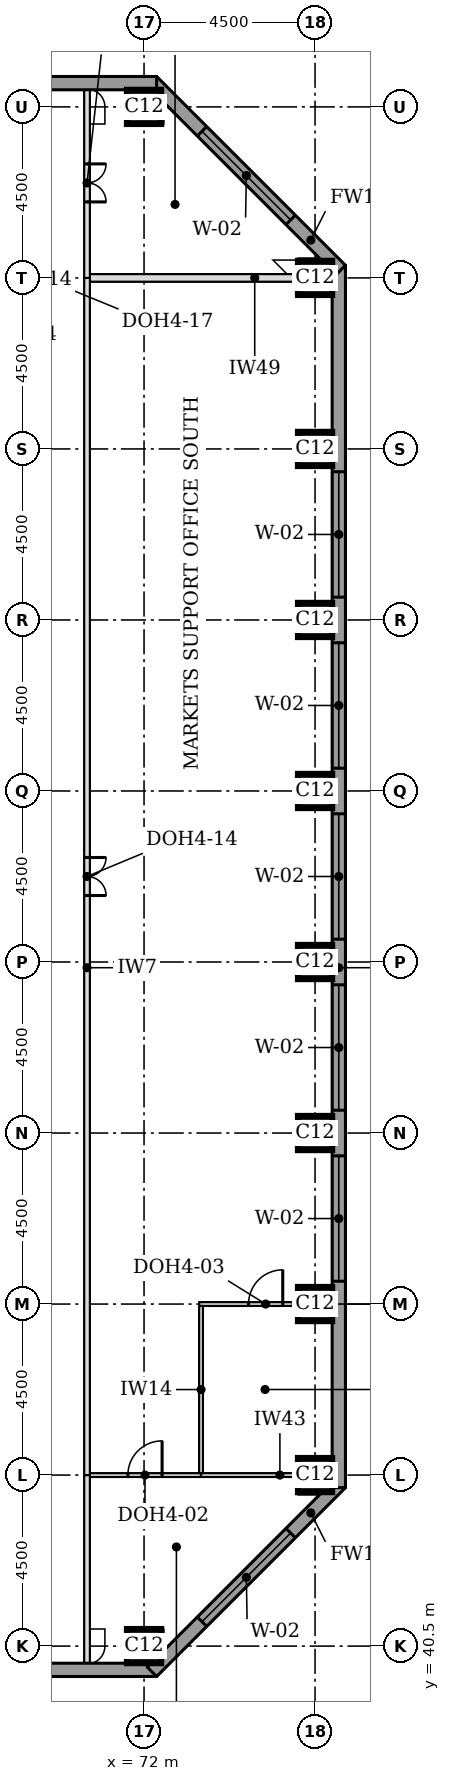
"""IFC4 building model, lengths in metres.
Left out: names, types, materials, properties, quantities, classifications, styles, units other than length and angle.
Written with IfcOpenShell. Run it as: python <this file> out.ifc"""

import sys

from ifc_helpers import new_model, si_unit, direction, frame, frame_2d, origin, origin_2d, place, context, subcontext, project, spatial, rectangle, extrude, element, fill, save


model = new_model("IFC4")
c1 = context("Model", 3, precision=1e-05, world=origin(), true_north=direction((0.0, 1.0)))
c2 = subcontext(c1, "Body", "Model", "MODEL_VIEW")
j1 = project(units=[si_unit("LENGTHUNIT", "METRE"), si_unit("PLANEANGLEUNIT", "RADIAN")], contexts=[c1])
p1 = place(None, origin())
s1 = spatial("IfcSite", under=j1, at=p1, CompositionType="ELEMENT")
p2 = place(p1, origin())
s2 = spatial("IfcBuilding", under=s1, at=p2, CompositionType="ELEMENT")
p3 = place(p2, frame((0.0, 0.0, 173.6)))
s3 = spatial("IfcBuildingStorey", under=s2, at=p3, CompositionType="ELEMENT", Elevation=173.6)
for number, where, z_axis, x_axis in (
    (1, (72.0, 40.5, 0.0), (0.0, 0.0, 1.0), (1.0, 0.0, 0.0)),
    (2, (76.5, 45.0, 0.0), (0.0, 0.0, 1.0), (1.0, 0.0, 0.0)),
    (3, (76.5, 49.5, 0.0), (0.0, 0.0, 1.0), (1.0, 0.0, 0.0)),
    (4, (76.5, 54.0, 0.0), (0.0, 0.0, 1.0), (1.0, 0.0, 0.0)),
    (5, (76.5, 58.5, 0.0), (0.0, 0.0, 1.0), (1.0, 0.0, 0.0)),
    (6, (76.5, 63.0, 0.0), (0.0, 0.0, 1.0), (1.0, 0.0, 0.0)),
    (7, (76.5, 67.5, 0.0), (0.0, 0.0, 1.0), (1.0, 0.0, 0.0)),
    (8, (76.5, 72.0, 0.0), (0.0, 0.0, 1.0), (1.0, 0.0, 0.0)),
    (9, (76.5, 76.5, 0.0), (0.0, 0.0, 1.0), (1.0, 0.0, 0.0)),
    (10, (72.0, 81.0, 0.0), (0.0, 0.0, 1.0), (1.0, 0.0, 0.0)),
):
    element("IfcColumn", number, at=place(p3, frame(where, z_axis=z_axis, x_axis=x_axis)), inside=s3, PredefinedType="COLUMN", context=c2, shape_type="SweptSolid", body=[
        extrude(rectangle(XDim=0.9, YDim=0.9, at=origin_2d()), origin(), (0.0, 0.0, 1.0), 3.7),
    ])
p4 = place(p3, frame((36.0, 39.875, 0.0), z_axis=(0.0, 0.0, 1.0), x_axis=(1.0, 0.0, 0.0)))
e11 = element("IfcWall", 11, at=p4, inside=s3, PredefinedType="STANDARD", context=c2, shape_type="SweptSolid", body=[
    extrude(rectangle(XDim=36.331, YDim=0.35, at=frame_2d((18.166, 0.0))), origin(), (0.0, 0.0, 1.0), 3.525),
])
p5 = place(p4, frame((5.1, 0.0, 0.9)))
e12 = element("IfcOpeningElement", 12, at=p5, cuts=e11, PredefinedType="OPENING", context=c2, shape_type="SweptSolid", body=[
    extrude(rectangle(XDim=3.3, YDim=1.9, at=frame_2d((1.65, 0.95))), frame((0.0, 0.185, 0.0), z_axis=(0.0, -1.0, 0.0), x_axis=(1.0, 0.0, 0.0)), (0.0, 0.0, 1.0), 0.37),
])
p6 = place(p4, frame((9.6, 0.0, 0.9)))
e13 = element("IfcOpeningElement", 13, at=p6, cuts=e11, PredefinedType="OPENING", context=c2, shape_type="SweptSolid", body=[
    extrude(rectangle(XDim=3.3, YDim=1.9, at=frame_2d((1.65, 0.95))), frame((0.0, 0.185, 0.0), z_axis=(0.0, -1.0, 0.0), x_axis=(1.0, 0.0, 0.0)), (0.0, 0.0, 1.0), 0.37),
])
p7 = place(p4, frame((14.1, 0.0, 0.9)))
e14 = element("IfcOpeningElement", 14, at=p7, cuts=e11, PredefinedType="OPENING", context=c2, shape_type="SweptSolid", body=[
    extrude(rectangle(XDim=3.3, YDim=1.9, at=frame_2d((1.65, 0.95))), frame((0.0, 0.185, 0.0), z_axis=(0.0, -1.0, 0.0), x_axis=(1.0, 0.0, 0.0)), (0.0, 0.0, 1.0), 0.37),
])
p8 = place(p4, frame((18.6, 0.0, 0.9)))
e15 = element("IfcOpeningElement", 15, at=p8, cuts=e11, PredefinedType="OPENING", context=c2, shape_type="SweptSolid", body=[
    extrude(rectangle(XDim=3.3, YDim=1.9, at=frame_2d((1.65, 0.95))), frame((0.0, 0.185, 0.0), z_axis=(0.0, -1.0, 0.0), x_axis=(1.0, 0.0, 0.0)), (0.0, 0.0, 1.0), 0.37),
])
p9 = place(p4, frame((23.1, 0.0, 0.9)))
e16 = element("IfcOpeningElement", 16, at=p9, cuts=e11, PredefinedType="OPENING", context=c2, shape_type="SweptSolid", body=[
    extrude(rectangle(XDim=3.3, YDim=1.9, at=frame_2d((1.65, 0.95))), frame((0.0, 0.185, 0.0), z_axis=(0.0, -1.0, 0.0), x_axis=(1.0, 0.0, 0.0)), (0.0, 0.0, 1.0), 0.37),
])
p10 = place(p4, frame((27.6, 0.0, 0.9)))
e17 = element("IfcOpeningElement", 17, at=p10, cuts=e11, PredefinedType="OPENING", context=c2, shape_type="SweptSolid", body=[
    extrude(rectangle(XDim=3.3, YDim=1.9, at=frame_2d((1.65, 0.95))), frame((0.0, 0.185, 0.0), z_axis=(0.0, -1.0, 0.0), x_axis=(1.0, 0.0, 0.0)), (0.0, 0.0, 1.0), 0.37),
])
p11 = place(p3, frame((72.208, 39.824, 0.0), z_axis=(0.0, 0.0, 1.0), x_axis=(0.707106781187, 0.707106781187, 0.0)))
e18 = element("IfcWall", 18, at=p11, inside=s3, PredefinedType="STANDARD", context=c2, shape_type="SweptSolid", body=[
    extrude(rectangle(XDim=7.027, YDim=0.35, at=frame_2d((3.513, 0.0))), origin(), (0.0, 0.0, 1.0), 3.525),
])
p12 = place(p11, frame((1.863, 0.0, 0.9)))
e19 = element("IfcOpeningElement", 19, at=p12, cuts=e18, PredefinedType="OPENING", context=c2, shape_type="SweptSolid", body=[
    extrude(rectangle(XDim=3.3, YDim=1.9, at=frame_2d((1.65, 0.95))), frame((0.0, 0.185, 0.0), z_axis=(0.0, -1.0, 0.0), x_axis=(1.0, 0.0, 0.0)), (0.0, 0.0, 1.0), 0.37),
])
p13 = place(p3, frame((77.125, 44.669, 0.0), z_axis=(0.0, 0.0, 1.0), x_axis=(0.0, 1.0, 0.0)))
e20 = element("IfcWall", 20, at=p13, inside=s3, PredefinedType="STANDARD", context=c2, shape_type="SweptSolid", body=[
    extrude(rectangle(XDim=32.163, YDim=0.35, at=frame_2d((16.081, 0.0))), origin(), (0.0, 0.0, 1.0), 3.525),
])
p14 = place(p13, frame((5.431, 0.0, 0.9)))
e21 = element("IfcOpeningElement", 21, at=p14, cuts=e20, PredefinedType="OPENING", context=c2, shape_type="SweptSolid", body=[
    extrude(rectangle(XDim=3.3, YDim=1.9, at=frame_2d((1.65, 0.95))), frame((0.0, 0.185, 0.0), z_axis=(0.0, -1.0, 0.0), x_axis=(1.0, 0.0, 0.0)), (0.0, 0.0, 1.0), 0.37),
])
p15 = place(p13, frame((9.931, 0.0, 0.9)))
e22 = element("IfcOpeningElement", 22, at=p15, cuts=e20, PredefinedType="OPENING", context=c2, shape_type="SweptSolid", body=[
    extrude(rectangle(XDim=3.3, YDim=1.9, at=frame_2d((1.65, 0.95))), frame((0.0, 0.185, 0.0), z_axis=(0.0, -1.0, 0.0), x_axis=(1.0, 0.0, 0.0)), (0.0, 0.0, 1.0), 0.37),
])
p16 = place(p13, frame((14.431, 0.0, 0.9)))
e23 = element("IfcOpeningElement", 23, at=p16, cuts=e20, PredefinedType="OPENING", context=c2, shape_type="SweptSolid", body=[
    extrude(rectangle(XDim=3.3, YDim=1.9, at=frame_2d((1.65, 0.95))), frame((0.0, 0.185, 0.0), z_axis=(0.0, -1.0, 0.0), x_axis=(1.0, 0.0, 0.0)), (0.0, 0.0, 1.0), 0.37),
])
p17 = place(p13, frame((18.931, 0.0, 0.9)))
e24 = element("IfcOpeningElement", 24, at=p17, cuts=e20, PredefinedType="OPENING", context=c2, shape_type="SweptSolid", body=[
    extrude(rectangle(XDim=3.3, YDim=1.9, at=frame_2d((1.65, 0.95))), frame((0.0, 0.185, 0.0), z_axis=(0.0, -1.0, 0.0), x_axis=(1.0, 0.0, 0.0)), (0.0, 0.0, 1.0), 0.37),
])
p18 = place(p13, frame((23.431, 0.0, 0.9)))
e25 = element("IfcOpeningElement", 25, at=p18, cuts=e20, PredefinedType="OPENING", context=c2, shape_type="SweptSolid", body=[
    extrude(rectangle(XDim=3.3, YDim=1.9, at=frame_2d((1.65, 0.95))), frame((0.0, 0.185, 0.0), z_axis=(0.0, -1.0, 0.0), x_axis=(1.0, 0.0, 0.0)), (0.0, 0.0, 1.0), 0.37),
])
p19 = place(p3, frame((77.176, 76.708, 0.0), z_axis=(0.0, 0.0, 1.0), x_axis=(-0.707106781187, 0.707106781187, 0.0)))
e26 = element("IfcWall", 26, at=p19, inside=s3, PredefinedType="STANDARD", context=c2, shape_type="SweptSolid", body=[
    extrude(rectangle(XDim=7.027, YDim=0.35, at=frame_2d((3.513, 0.0))), origin(), (0.0, 0.0, 1.0), 3.525),
])
p20 = place(p19, frame((1.863, 0.0, 0.9)))
e27 = element("IfcOpeningElement", 27, at=p20, cuts=e26, PredefinedType="OPENING", context=c2, shape_type="SweptSolid", body=[
    extrude(rectangle(XDim=3.3, YDim=1.9, at=frame_2d((1.65, 0.95))), frame((0.0, 0.185, 0.0), z_axis=(0.0, -1.0, 0.0), x_axis=(1.0, 0.0, 0.0)), (0.0, 0.0, 1.0), 0.37),
])
p21 = place(p3, frame((72.331, 81.625, 0.0), z_axis=(0.0, 0.0, 1.0), x_axis=(-1.0, 0.0, 0.0)))
e28 = element("IfcWall", 28, at=p21, inside=s3, PredefinedType="STANDARD", context=c2, shape_type="SweptSolid", body=[
    extrude(rectangle(XDim=32.163, YDim=0.35, at=frame_2d((16.081, 0.0))), origin(), (0.0, 0.0, 1.0), 3.525),
])
p22 = place(p21, frame((5.431, 0.0, 0.9)))
e29 = element("IfcOpeningElement", 29, at=p22, cuts=e28, PredefinedType="OPENING", context=c2, shape_type="SweptSolid", body=[
    extrude(rectangle(XDim=3.3, YDim=1.9, at=frame_2d((1.65, 0.95))), frame((0.0, 0.185, 0.0), z_axis=(0.0, -1.0, 0.0), x_axis=(1.0, 0.0, 0.0)), (0.0, 0.0, 1.0), 0.37),
])
p23 = place(p21, frame((9.931, 0.0, 0.9)))
e30 = element("IfcOpeningElement", 30, at=p23, cuts=e28, PredefinedType="OPENING", context=c2, shape_type="SweptSolid", body=[
    extrude(rectangle(XDim=3.3, YDim=1.9, at=frame_2d((1.65, 0.95))), frame((0.0, 0.185, 0.0), z_axis=(0.0, -1.0, 0.0), x_axis=(1.0, 0.0, 0.0)), (0.0, 0.0, 1.0), 0.37),
])
p24 = place(p21, frame((14.431, 0.0, 0.9)))
e31 = element("IfcOpeningElement", 31, at=p24, cuts=e28, PredefinedType="OPENING", context=c2, shape_type="SweptSolid", body=[
    extrude(rectangle(XDim=3.3, YDim=1.9, at=frame_2d((1.65, 0.95))), frame((0.0, 0.185, 0.0), z_axis=(0.0, -1.0, 0.0), x_axis=(1.0, 0.0, 0.0)), (0.0, 0.0, 1.0), 0.37),
])
p25 = place(p21, frame((18.931, 0.0, 0.9)))
e32 = element("IfcOpeningElement", 32, at=p25, cuts=e28, PredefinedType="OPENING", context=c2, shape_type="SweptSolid", body=[
    extrude(rectangle(XDim=3.3, YDim=1.9, at=frame_2d((1.65, 0.95))), frame((0.0, 0.185, 0.0), z_axis=(0.0, -1.0, 0.0), x_axis=(1.0, 0.0, 0.0)), (0.0, 0.0, 1.0), 0.37),
])
p26 = place(p21, frame((23.431, 0.0, 0.9)))
e33 = element("IfcOpeningElement", 33, at=p26, cuts=e28, PredefinedType="OPENING", context=c2, shape_type="SweptSolid", body=[
    extrude(rectangle(XDim=3.3, YDim=1.9, at=frame_2d((1.65, 0.95))), frame((0.0, 0.185, 0.0), z_axis=(0.0, -1.0, 0.0), x_axis=(1.0, 0.0, 0.0)), (0.0, 0.0, 1.0), 0.37),
])
p27 = place(p3, frame((70.575, 45.0, 0.0), z_axis=(0.0, 0.0, 1.0), x_axis=(1.0, 0.0, 0.0)))
e34 = element("IfcWall", 34, at=p27, inside=s3, PredefinedType="PARTITIONING", context=c2, shape_type="SweptSolid", body=[
    extrude(rectangle(XDim=2.925, YDim=0.1, at=frame_2d((1.462, 0.0))), origin(), (0.0, 0.0, 1.0), 3.096),
])
p28 = place(p27, frame((1.0, 0.0, 0.0)))
e35 = element("IfcOpeningElement", 35, at=p28, cuts=e34, PredefinedType="OPENING", context=c2, shape_type="SweptSolid", body=[
    extrude(rectangle(XDim=0.9, YDim=2.1, at=frame_2d((0.45, 1.05))), frame((0.0, 0.06, 0.0), z_axis=(0.0, -1.0, 0.0), x_axis=(1.0, 0.0, 0.0)), (0.0, 0.0, 1.0), 0.12),
])
p29 = place(p3, frame((73.5, 45.0, 0.0), z_axis=(0.0, 0.0, 1.0), x_axis=(1.0, 0.0, 0.0)))
e36 = element("IfcWall", 36, at=p29, inside=s3, PredefinedType="PARTITIONING", context=c2, shape_type="SweptSolid", body=[
    extrude(rectangle(XDim=2.55, YDim=0.1, at=frame_2d((1.275, 0.0))), origin(), (0.0, 0.0, 1.0), 3.096),
])
p30 = place(p3, frame((73.45, 49.5, 0.0), z_axis=(0.0, 0.0, 1.0), x_axis=(1.0, 0.0, 0.0)))
e37 = element("IfcWall", 37, at=p30, inside=s3, PredefinedType="PARTITIONING", context=c2, shape_type="SweptSolid", body=[
    extrude(rectangle(XDim=3.5, YDim=0.1, at=frame_2d((1.75, 0.0))), origin(), (0.0, 0.0, 1.0), 3.55),
])
p31 = place(p30, frame((1.3, 0.0, 0.0)))
e38 = element("IfcOpeningElement", 38, at=p31, cuts=e37, PredefinedType="OPENING", context=c2, shape_type="SweptSolid", body=[
    extrude(rectangle(XDim=0.9, YDim=2.1, at=frame_2d((0.45, 1.05))), frame((0.0, 0.06, 0.0), z_axis=(0.0, -1.0, 0.0), x_axis=(1.0, 0.0, 0.0)), (0.0, 0.0, 1.0), 0.12),
])
p32 = place(p3, frame((70.575, 76.5, 0.0), z_axis=(0.0, 0.0, 1.0), x_axis=(1.0, 0.0, 0.0)))
e39 = element("IfcWall", 39, at=p32, inside=s3, PredefinedType="PARTITIONING", context=c2, shape_type="SweptSolid", body=[
    extrude(rectangle(XDim=5.475, YDim=0.2, at=frame_2d((2.738, 0.0))), origin(), (0.0, 0.0, 1.0), 3.096),
])
p33 = place(p3, frame((70.5, 40.05, 0.0), z_axis=(0.0, 0.0, 1.0), x_axis=(0.0, 1.0, 0.0)))
e40 = element("IfcWall", 40, at=p33, inside=s3, PredefinedType="PARTITIONING", context=c2, shape_type="SweptSolid", body=[
    extrude(rectangle(XDim=4.95, YDim=0.15, at=frame_2d((2.475, 0.0))), origin(), (0.0, 0.0, 1.0), 3.55),
])
p34 = place(p3, frame((70.5, 45.0, 0.0), z_axis=(0.0, 0.0, 1.0), x_axis=(0.0, 1.0, 0.0)))
e41 = element("IfcWall", 41, at=p34, inside=s3, PredefinedType="PARTITIONING", context=c2, shape_type="SweptSolid", body=[
    extrude(rectangle(XDim=31.5, YDim=0.15, at=frame_2d((15.75, 0.0))), origin(), (0.0, 0.0, 1.0), 3.55),
])
p35 = place(p34, frame((15.25, 0.0, 0.0)))
e42 = element("IfcOpeningElement", 42, at=p35, cuts=e41, PredefinedType="OPENING", context=c2, shape_type="SweptSolid", body=[
    extrude(rectangle(XDim=1.0, YDim=2.1, at=frame_2d((0.5, 1.05))), frame((0.0, 0.085, 0.0), z_axis=(0.0, -1.0, 0.0), x_axis=(1.0, 0.0, 0.0)), (0.0, 0.0, 1.0), 0.17),
])
p36 = place(p3, frame((73.5, 45.05, 0.0), z_axis=(0.0, 0.0, 1.0), x_axis=(0.0, 1.0, 0.0)))
e43 = element("IfcWall", 43, at=p36, inside=s3, PredefinedType="PARTITIONING", context=c2, shape_type="SweptSolid", body=[
    extrude(rectangle(XDim=4.4, YDim=0.1, at=frame_2d((2.2, 0.0))), origin(), (0.0, 0.0, 1.0), 3.55),
])
p37 = place(p3, frame((70.5, 76.5, 0.0), z_axis=(0.0, 0.0, 1.0), x_axis=(0.0, 1.0, 0.0)))
e44 = element("IfcWall", 44, at=p37, inside=s3, PredefinedType="PARTITIONING", context=c2, shape_type="SweptSolid", body=[
    extrude(rectangle(XDim=4.95, YDim=0.15, at=frame_2d((2.475, 0.0))), origin(), (0.0, 0.0, 1.0), 3.55),
])
p38 = place(p37, frame((2.0, 0.0, 0.0)))
e45 = element("IfcOpeningElement", 45, at=p38, cuts=e44, PredefinedType="OPENING", context=c2, shape_type="SweptSolid", body=[
    extrude(rectangle(XDim=1.0, YDim=2.1, at=frame_2d((0.5, 1.05))), frame((0.0, 0.085, 0.0), z_axis=(0.0, -1.0, 0.0), x_axis=(1.0, 0.0, 0.0)), (0.0, 0.0, 1.0), 0.17),
])
p39 = place(p12, origin())
e46 = element("IfcWindow", 46, at=p39, inside=s3, PartitioningType="SINGLE_PANEL", PredefinedType="WINDOW", context=c2, shape_type="SweptSolid", body=[
    extrude(rectangle(XDim=3.3, YDim=1.9, at=frame_2d((1.65, 0.95))), frame((0.0, 0.085, 0.0), z_axis=(0.0, -1.0, 0.0), x_axis=(1.0, 0.0, 0.0)), (0.0, 0.0, 1.0), 0.06),
])
fill(e19, e46)
p40 = place(p14, origin())
e47 = element("IfcWindow", 47, at=p40, inside=s3, PartitioningType="SINGLE_PANEL", PredefinedType="WINDOW", context=c2, shape_type="SweptSolid", body=[
    extrude(rectangle(XDim=3.3, YDim=1.9, at=frame_2d((1.65, 0.95))), frame((0.0, 0.085, 0.0), z_axis=(0.0, -1.0, 0.0), x_axis=(1.0, 0.0, 0.0)), (0.0, 0.0, 1.0), 0.06),
])
fill(e21, e47)
p41 = place(p15, origin())
e48 = element("IfcWindow", 48, at=p41, inside=s3, PartitioningType="SINGLE_PANEL", PredefinedType="WINDOW", context=c2, shape_type="SweptSolid", body=[
    extrude(rectangle(XDim=3.3, YDim=1.9, at=frame_2d((1.65, 0.95))), frame((0.0, 0.085, 0.0), z_axis=(0.0, -1.0, 0.0), x_axis=(1.0, 0.0, 0.0)), (0.0, 0.0, 1.0), 0.06),
])
fill(e22, e48)
p42 = place(p16, origin())
e49 = element("IfcWindow", 49, at=p42, inside=s3, PartitioningType="SINGLE_PANEL", PredefinedType="WINDOW", context=c2, shape_type="SweptSolid", body=[
    extrude(rectangle(XDim=3.3, YDim=1.9, at=frame_2d((1.65, 0.95))), frame((0.0, 0.085, 0.0), z_axis=(0.0, -1.0, 0.0), x_axis=(1.0, 0.0, 0.0)), (0.0, 0.0, 1.0), 0.06),
])
fill(e23, e49)
p43 = place(p17, origin())
e50 = element("IfcWindow", 50, at=p43, inside=s3, PartitioningType="SINGLE_PANEL", PredefinedType="WINDOW", context=c2, shape_type="SweptSolid", body=[
    extrude(rectangle(XDim=3.3, YDim=1.9, at=frame_2d((1.65, 0.95))), frame((0.0, 0.085, 0.0), z_axis=(0.0, -1.0, 0.0), x_axis=(1.0, 0.0, 0.0)), (0.0, 0.0, 1.0), 0.06),
])
fill(e24, e50)
p44 = place(p18, origin())
e51 = element("IfcWindow", 51, at=p44, inside=s3, PartitioningType="SINGLE_PANEL", PredefinedType="WINDOW", context=c2, shape_type="SweptSolid", body=[
    extrude(rectangle(XDim=3.3, YDim=1.9, at=frame_2d((1.65, 0.95))), frame((0.0, 0.085, 0.0), z_axis=(0.0, -1.0, 0.0), x_axis=(1.0, 0.0, 0.0)), (0.0, 0.0, 1.0), 0.06),
])
fill(e25, e51)
p45 = place(p20, origin())
e52 = element("IfcWindow", 52, at=p45, inside=s3, PartitioningType="SINGLE_PANEL", PredefinedType="WINDOW", context=c2, shape_type="SweptSolid", body=[
    extrude(rectangle(XDim=3.3, YDim=1.9, at=frame_2d((1.65, 0.95))), frame((0.0, 0.085, 0.0), z_axis=(0.0, -1.0, 0.0), x_axis=(1.0, 0.0, 0.0)), (0.0, 0.0, 1.0), 0.06),
])
fill(e27, e52)
p46 = place(p35, frame((1.0, 0.0, 0.0), z_axis=(0.0, 0.0, 1.0), x_axis=(-1.0, 0.0, 0.0)))
e53 = element("IfcDoor", 53, at=p46, inside=s3, OperationType="DOUBLE_DOOR_SINGLE_SWING", PredefinedType="DOOR", context=c2, shape_type="SweptSolid", body=[
    extrude(rectangle(XDim=1.0, YDim=2.1, at=frame_2d((0.5, 1.05))), frame((0.0, 0.025, 0.0), z_axis=(0.0, -1.0, 0.0), x_axis=(1.0, 0.0, 0.0)), (0.0, 0.0, 1.0), 0.05),
])
fill(e42, e53)
p47 = place(p28, origin())
e54 = element("IfcDoor", 54, at=p47, inside=s3, OperationType="SINGLE_SWING_RIGHT", PredefinedType="DOOR", context=c2, shape_type="SweptSolid", body=[
    extrude(rectangle(XDim=0.9, YDim=2.1, at=frame_2d((0.45, 1.05))), frame((0.0, 0.025, 0.0), z_axis=(0.0, -1.0, 0.0), x_axis=(1.0, 0.0, 0.0)), (0.0, 0.0, 1.0), 0.05),
])
fill(e35, e54)
p48 = place(p31, origin())
e55 = element("IfcDoor", 55, at=p48, inside=s3, OperationType="SINGLE_SWING_RIGHT", PredefinedType="DOOR", context=c2, shape_type="SweptSolid", body=[
    extrude(rectangle(XDim=0.9, YDim=2.1, at=frame_2d((0.45, 1.05))), frame((0.0, 0.025, 0.0), z_axis=(0.0, -1.0, 0.0), x_axis=(1.0, 0.0, 0.0)), (0.0, 0.0, 1.0), 0.05),
])
fill(e38, e55)
p49 = place(p38, frame((1.0, 0.0, 0.0), z_axis=(0.0, 0.0, 1.0), x_axis=(-1.0, 0.0, 0.0)))
e56 = element("IfcDoor", 56, at=p49, inside=s3, OperationType="DOUBLE_DOOR_SINGLE_SWING", PredefinedType="DOOR", context=c2, shape_type="SweptSolid", body=[
    extrude(rectangle(XDim=1.0, YDim=2.1, at=frame_2d((0.5, 1.05))), frame((0.0, 0.025, 0.0), z_axis=(0.0, -1.0, 0.0), x_axis=(1.0, 0.0, 0.0)), (0.0, 0.0, 1.0), 0.05),
])
fill(e45, e56)
save(model, sys.argv[1])
